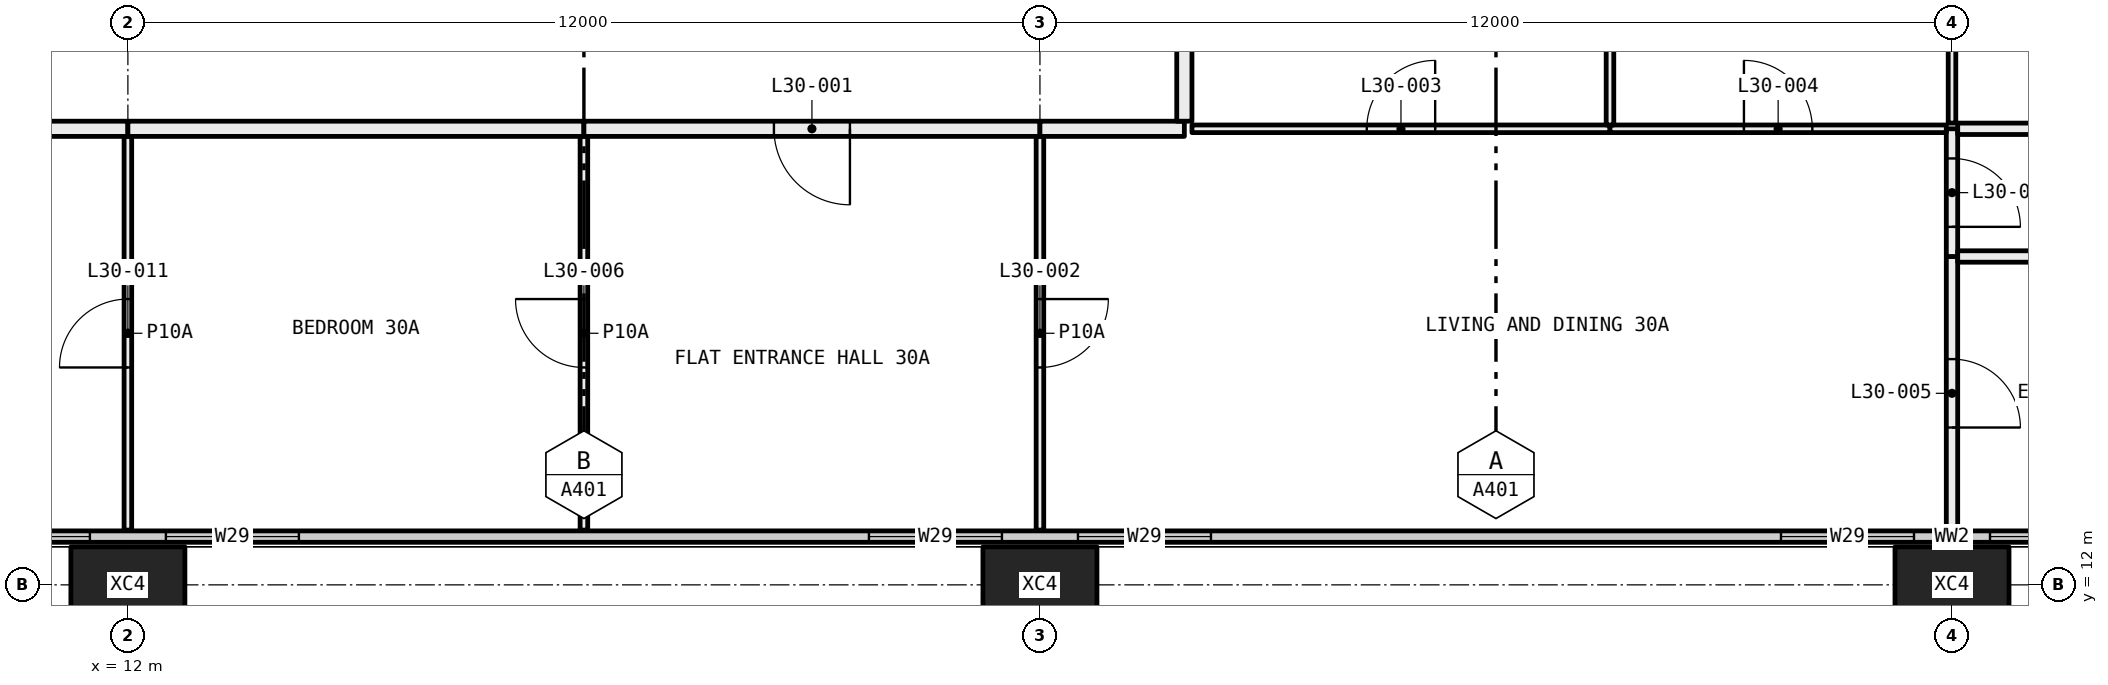
"""IFC4 building model, lengths in metres.
Left out: names, types, materials, properties, quantities, classifications, styles, units other than length and angle.
Written with IfcOpenShell. Run it as: python <this file> out.ifc"""

import sys

from ifc_helpers import new_model, si_unit, direction, frame, frame_2d, origin, origin_2d, place, context, subcontext, project, spatial, rectangle, hollow_rectangle, extrude, element, fill, save


model = new_model("IFC4")
c1 = context("Model", 3, precision=1e-05, world=origin(), true_north=direction((0.0, 1.0)))
c2 = subcontext(c1, "Body", "Model", "MODEL_VIEW")
j1 = project(units=[si_unit("LENGTHUNIT", "METRE"), si_unit("PLANEANGLEUNIT", "RADIAN")], contexts=[c1])
p1 = place(None, origin())
s1 = spatial("IfcSite", under=j1, at=p1, CompositionType="ELEMENT")
p2 = place(p1, origin())
s2 = spatial("IfcBuilding", under=s1, at=p2, CompositionType="ELEMENT")
p3 = place(p2, frame((0.0, 0.0, 117.3)))
s3 = spatial("IfcBuildingStorey", under=s2, at=p3, CompositionType="ELEMENT", Elevation=117.3)
for number, where, z_axis, x_axis in (
    (1, (12.0, 12.0, -0.4), (0.0, 0.0, 1.0), (1.0, 0.0, 0.0)),
    (2, (24.0, 12.0, -0.4), (0.0, 0.0, 1.0), (1.0, 0.0, 0.0)),
    (3, (36.0, 12.0, -0.4), (0.0, 0.0, 1.0), (1.0, 0.0, 0.0)),
):
    element("IfcColumn", number, at=place(p3, frame(where, z_axis=z_axis, x_axis=x_axis)), inside=s3, PredefinedType="COLUMN", context=c2, shape_type="SweptSolid", body=[
        extrude(hollow_rectangle(XDim=1.5, YDim=1.0, WallThickness=0.06, at=origin_2d()), origin(), (0.0, 0.0, 1.0), 3.45),
    ])
p4 = place(p3, frame((6.56, 12.635, 0.0), z_axis=(0.0, 0.0, 1.0), x_axis=(1.0, 0.0, 0.0)))
e4 = element("IfcWall", 4, at=p4, inside=s3, PredefinedType="ELEMENTEDWALL", context=c2, shape_type="SweptSolid", body=[
    extrude(rectangle(XDim=58.88, YDim=0.15, at=frame_2d((29.44, 0.0))), origin(), (0.0, 0.0, 1.0), 3.05),
])
p5 = place(p4, frame((0.44, 0.0, 0.45)))
e5 = element("IfcOpeningElement", 5, at=p5, cuts=e4, PredefinedType="OPENING", context=c2, shape_type="SweptSolid", body=[
    extrude(rectangle(XDim=4.5, YDim=2.55, at=frame_2d((2.25, 1.275))), frame((0.0, 0.085, 0.0), z_axis=(0.0, -1.0, 0.0), x_axis=(1.0, 0.0, 0.0)), (0.0, 0.0, 1.0), 0.17),
])
p6 = place(p4, frame((5.94, 0.0, 0.45)))
e6 = element("IfcOpeningElement", 6, at=p6, cuts=e4, PredefinedType="OPENING", context=c2, shape_type="SweptSolid", body=[
    extrude(rectangle(XDim=1.75, YDim=2.55, at=frame_2d((0.875, 1.275))), frame((0.0, 0.085, 0.0), z_axis=(0.0, -1.0, 0.0), x_axis=(1.0, 0.0, 0.0)), (0.0, 0.0, 1.0), 0.17),
])
p7 = place(p4, frame((15.19, 0.0, 0.45)))
e7 = element("IfcOpeningElement", 7, at=p7, cuts=e4, PredefinedType="OPENING", context=c2, shape_type="SweptSolid", body=[
    extrude(rectangle(XDim=1.75, YDim=2.55, at=frame_2d((0.875, 1.275))), frame((0.0, 0.085, 0.0), z_axis=(0.0, -1.0, 0.0), x_axis=(1.0, 0.0, 0.0)), (0.0, 0.0, 1.0), 0.17),
])
p8 = place(p4, frame((17.94, 0.0, 0.45)))
e8 = element("IfcOpeningElement", 8, at=p8, cuts=e4, PredefinedType="OPENING", context=c2, shape_type="SweptSolid", body=[
    extrude(rectangle(XDim=1.75, YDim=2.55, at=frame_2d((0.875, 1.275))), frame((0.0, 0.085, 0.0), z_axis=(0.0, -1.0, 0.0), x_axis=(1.0, 0.0, 0.0)), (0.0, 0.0, 1.0), 0.17),
])
p9 = place(p4, frame((27.19, 0.0, 0.45)))
e9 = element("IfcOpeningElement", 9, at=p9, cuts=e4, PredefinedType="OPENING", context=c2, shape_type="SweptSolid", body=[
    extrude(rectangle(XDim=1.75, YDim=2.55, at=frame_2d((0.875, 1.275))), frame((0.0, 0.085, 0.0), z_axis=(0.0, -1.0, 0.0), x_axis=(1.0, 0.0, 0.0)), (0.0, 0.0, 1.0), 0.17),
])
p10 = place(p4, frame((29.94, 0.0, 0.45)))
e10 = element("IfcOpeningElement", 10, at=p10, cuts=e4, PredefinedType="OPENING", context=c2, shape_type="SweptSolid", body=[
    extrude(rectangle(XDim=1.75, YDim=2.55, at=frame_2d((0.875, 1.275))), frame((0.0, 0.085, 0.0), z_axis=(0.0, -1.0, 0.0), x_axis=(1.0, 0.0, 0.0)), (0.0, 0.0, 1.0), 0.17),
])
p11 = place(p4, frame((39.19, 0.0, 0.45)))
e11 = element("IfcOpeningElement", 11, at=p11, cuts=e4, PredefinedType="OPENING", context=c2, shape_type="SweptSolid", body=[
    extrude(rectangle(XDim=1.75, YDim=2.55, at=frame_2d((0.875, 1.275))), frame((0.0, 0.085, 0.0), z_axis=(0.0, -1.0, 0.0), x_axis=(1.0, 0.0, 0.0)), (0.0, 0.0, 1.0), 0.17),
])
p12 = place(p4, frame((41.94, 0.0, 0.45)))
e12 = element("IfcOpeningElement", 12, at=p12, cuts=e4, PredefinedType="OPENING", context=c2, shape_type="SweptSolid", body=[
    extrude(rectangle(XDim=1.75, YDim=2.55, at=frame_2d((0.875, 1.275))), frame((0.0, 0.085, 0.0), z_axis=(0.0, -1.0, 0.0), x_axis=(1.0, 0.0, 0.0)), (0.0, 0.0, 1.0), 0.17),
])
p13 = place(p4, frame((51.19, 0.0, 0.45)))
e13 = element("IfcOpeningElement", 13, at=p13, cuts=e4, PredefinedType="OPENING", context=c2, shape_type="SweptSolid", body=[
    extrude(rectangle(XDim=1.75, YDim=2.55, at=frame_2d((0.875, 1.275))), frame((0.0, 0.085, 0.0), z_axis=(0.0, -1.0, 0.0), x_axis=(1.0, 0.0, 0.0)), (0.0, 0.0, 1.0), 0.17),
])
p14 = place(p4, frame((53.94, 0.0, 0.45)))
e14 = element("IfcOpeningElement", 14, at=p14, cuts=e4, PredefinedType="OPENING", context=c2, shape_type="SweptSolid", body=[
    extrude(rectangle(XDim=4.5, YDim=2.55, at=frame_2d((2.25, 1.275))), frame((0.0, 0.085, 0.0), z_axis=(0.0, -1.0, 0.0), x_axis=(1.0, 0.0, 0.0)), (0.0, 0.0, 1.0), 0.17),
])
p15 = place(p3, frame((12.0, 12.72, 0.0), z_axis=(0.0, 0.0, 1.0), x_axis=(0.0, 1.0, 0.0)))
e15 = element("IfcWall", 15, at=p15, inside=s3, PredefinedType="PARTITIONING", context=c2, shape_type="SweptSolid", body=[
    extrude(rectangle(XDim=5.18, YDim=0.1, at=frame_2d((2.59, 0.0))), origin(), (0.0, 0.0, 1.0), 3.05),
])
p16 = place(p15, frame((2.14, 0.0, 0.0)))
e16 = element("IfcOpeningElement", 16, at=p16, cuts=e15, PredefinedType="OPENING", context=c2, shape_type="SweptSolid", body=[
    extrude(rectangle(XDim=0.9, YDim=2.1, at=frame_2d((0.45, 1.05))), frame((0.0, 0.06, 0.0), z_axis=(0.0, -1.0, 0.0), x_axis=(1.0, 0.0, 0.0)), (0.0, 0.0, 1.0), 0.12),
])
p17 = place(p3, frame((12.0, 18.0, 0.0), z_axis=(0.0, 0.0, 1.0), x_axis=(-1.0, 0.0, 0.0)))
e17 = element("IfcWall", 17, at=p17, inside=s3, PredefinedType="PARTITIONING", context=c2, shape_type="SweptSolid", body=[
    extrude(rectangle(XDim=1.9, YDim=0.2, at=frame_2d((0.95, 0.0))), origin(), (0.0, 0.0, 1.0), 3.05),
])
p18 = place(p3, frame((18.0, 12.72, 0.0), z_axis=(0.0, 0.0, 1.0), x_axis=(0.0, 1.0, 0.0)))
e18 = element("IfcWall", 18, at=p18, inside=s3, PredefinedType="PARTITIONING", context=c2, shape_type="SweptSolid", body=[
    extrude(rectangle(XDim=5.18, YDim=0.1, at=frame_2d((2.59, 0.0))), origin(), (0.0, 0.0, 1.0), 3.05),
])
p19 = place(p18, frame((2.14, 0.0, 0.0)))
e19 = element("IfcOpeningElement", 19, at=p19, cuts=e18, PredefinedType="OPENING", context=c2, shape_type="SweptSolid", body=[
    extrude(rectangle(XDim=0.9, YDim=2.1, at=frame_2d((0.45, 1.05))), frame((0.0, 0.06, 0.0), z_axis=(0.0, -1.0, 0.0), x_axis=(1.0, 0.0, 0.0)), (0.0, 0.0, 1.0), 0.12),
])
p20 = place(p3, frame((18.0, 18.0, 0.0), z_axis=(0.0, 0.0, 1.0), x_axis=(-1.0, 0.0, 0.0)))
e20 = element("IfcWall", 20, at=p20, inside=s3, PredefinedType="PARTITIONING", context=c2, shape_type="SweptSolid", body=[
    extrude(rectangle(XDim=6.0, YDim=0.2, at=frame_2d((3.0, 0.0))), origin(), (0.0, 0.0, 1.0), 3.05),
])
p21 = place(p3, frame((24.0, 12.72, 0.0), z_axis=(0.0, 0.0, 1.0), x_axis=(0.0, 1.0, 0.0)))
e21 = element("IfcWall", 21, at=p21, inside=s3, PredefinedType="PARTITIONING", context=c2, shape_type="SweptSolid", body=[
    extrude(rectangle(XDim=5.18, YDim=0.1, at=frame_2d((2.59, 0.0))), origin(), (0.0, 0.0, 1.0), 3.05),
])
p22 = place(p21, frame((2.14, 0.0, 0.0)))
e22 = element("IfcOpeningElement", 22, at=p22, cuts=e21, PredefinedType="OPENING", context=c2, shape_type="SweptSolid", body=[
    extrude(rectangle(XDim=0.9, YDim=2.1, at=frame_2d((0.45, 1.05))), frame((0.0, 0.06, 0.0), z_axis=(0.0, -1.0, 0.0), x_axis=(1.0, 0.0, 0.0)), (0.0, 0.0, 1.0), 0.12),
])
p23 = place(p3, frame((24.0, 18.0, 0.0), z_axis=(0.0, 0.0, 1.0), x_axis=(-1.0, 0.0, 0.0)))
e23 = element("IfcWall", 23, at=p23, inside=s3, PredefinedType="PARTITIONING", context=c2, shape_type="SweptSolid", body=[
    extrude(rectangle(XDim=6.0, YDim=0.2, at=frame_2d((3.0, 0.0))), origin(), (0.0, 0.0, 1.0), 3.05),
])
p24 = place(p23, frame((2.5, 0.0, 0.0)))
e24 = element("IfcOpeningElement", 24, at=p24, cuts=e23, PredefinedType="OPENING", context=c2, shape_type="SweptSolid", body=[
    extrude(rectangle(XDim=1.0, YDim=2.1, at=frame_2d((0.5, 1.05))), frame((0.0, 0.11, 0.0), z_axis=(0.0, -1.0, 0.0), x_axis=(1.0, 0.0, 0.0)), (0.0, 0.0, 1.0), 0.22),
])
p25 = place(p3, frame((36.0, 12.72, 0.0), z_axis=(0.0, 0.0, 1.0), x_axis=(0.0, 1.0, 0.0)))
e25 = element("IfcWall", 25, at=p25, inside=s3, PredefinedType="PARTITIONING", context=c2, shape_type="SweptSolid", body=[
    extrude(rectangle(XDim=3.6, YDim=0.15, at=frame_2d((1.8, 0.0))), origin(), (0.0, 0.0, 1.0), 2.45),
])
p26 = place(p25, frame((1.35, 0.0, 0.0)))
e26 = element("IfcOpeningElement", 26, at=p26, cuts=e25, PredefinedType="OPENING", context=c2, shape_type="SweptSolid", body=[
    extrude(rectangle(XDim=0.9, YDim=2.1, at=frame_2d((0.45, 1.05))), frame((0.0, 0.085, 0.0), z_axis=(0.0, -1.0, 0.0), x_axis=(1.0, 0.0, 0.0)), (0.0, 0.0, 1.0), 0.17),
])
p27 = place(p3, frame((36.0, 16.32, 0.0), z_axis=(0.0, 0.0, 1.0), x_axis=(0.0, 1.0, 0.0)))
e27 = element("IfcWall", 27, at=p27, inside=s3, PredefinedType="PARTITIONING", context=c2, shape_type="SweptSolid", body=[
    extrude(rectangle(XDim=1.68, YDim=0.15, at=frame_2d((0.84, 0.0))), origin(), (0.0, 0.0, 1.0), 2.45),
])
p28 = place(p27, frame((0.39, 0.0, 0.0)))
e28 = element("IfcOpeningElement", 28, at=p28, cuts=e27, PredefinedType="OPENING", context=c2, shape_type="SweptSolid", body=[
    extrude(rectangle(XDim=0.9, YDim=2.1, at=frame_2d((0.45, 1.05))), frame((0.0, 0.085, 0.0), z_axis=(0.0, -1.0, 0.0), x_axis=(1.0, 0.0, 0.0)), (0.0, 0.0, 1.0), 0.17),
])
p29 = place(p3, frame((31.5, 18.0, 0.0), z_axis=(0.0, 0.0, 1.0), x_axis=(-1.0, 0.0, 0.0)))
e29 = element("IfcWall", 29, at=p29, inside=s3, PredefinedType="PARTITIONING", context=c2, shape_type="SweptSolid", body=[
    extrude(rectangle(XDim=5.5, YDim=0.1, at=frame_2d((2.75, 0.0))), origin(), (0.0, 0.0, 1.0), 3.05),
])
p30 = place(p29, frame((2.3, 0.0, 0.0)))
e30 = element("IfcOpeningElement", 30, at=p30, cuts=e29, PredefinedType="OPENING", context=c2, shape_type="SweptSolid", body=[
    extrude(rectangle(XDim=0.9, YDim=2.1, at=frame_2d((0.45, 1.05))), frame((0.0, 0.06, 0.0), z_axis=(0.0, -1.0, 0.0), x_axis=(1.0, 0.0, 0.0)), (0.0, 0.0, 1.0), 0.12),
])
p31 = place(p3, frame((35.925, 18.0, 0.0), z_axis=(0.0, 0.0, 1.0), x_axis=(-1.0, 0.0, 0.0)))
e31 = element("IfcWall", 31, at=p31, inside=s3, PredefinedType="PARTITIONING", context=c2, shape_type="SweptSolid", body=[
    extrude(rectangle(XDim=4.425, YDim=0.1, at=frame_2d((2.212, 0.0))), origin(), (0.0, 0.0, 1.0), 2.45),
])
p32 = place(p31, frame((1.762, 0.0, 0.0)))
e32 = element("IfcOpeningElement", 32, at=p32, cuts=e31, PredefinedType="OPENING", context=c2, shape_type="SweptSolid", body=[
    extrude(rectangle(XDim=0.9, YDim=2.1, at=frame_2d((0.45, 1.05))), frame((0.0, 0.06, 0.0), z_axis=(0.0, -1.0, 0.0), x_axis=(1.0, 0.0, 0.0)), (0.0, 0.0, 1.0), 0.12),
])
p33 = place(p3, frame((25.9, 18.0, 0.0), z_axis=(0.0, 0.0, 1.0), x_axis=(-1.0, 0.0, 0.0)))
e33 = element("IfcWall", 33, at=p33, inside=s3, PredefinedType="PARTITIONING", context=c2, shape_type="SweptSolid", body=[
    extrude(rectangle(XDim=1.9, YDim=0.2, at=frame_2d((0.95, 0.0))), origin(), (0.0, 0.0, 1.0), 3.05),
])
for number, where, z_axis, x_axis in (
    (34, (41.9, 16.32, 0.0), (0.0, 0.0, 1.0), (-1.0, 0.0, 0.0)),
    (35, (41.9, 18.0, 0.0), (0.0, 0.0, 1.0), (-1.0, 0.0, 0.0)),
):
    element("IfcWall", number, at=place(p3, frame(where, z_axis=z_axis, x_axis=x_axis)), inside=s3, PredefinedType="PARTITIONING", context=c2, shape_type="SweptSolid", body=[
        extrude(rectangle(XDim=5.825, YDim=0.15, at=frame_2d((2.913, 0.0))), origin(), (0.0, 0.0, 1.0), 2.45),
    ])
p34 = place(p3, frame((31.5, 18.05, 0.0), z_axis=(0.0, 0.0, 1.0), x_axis=(0.0, 1.0, 0.0)))
e36 = element("IfcWall", 36, at=p34, inside=s3, PredefinedType="PARTITIONING", context=c2, shape_type="SweptSolid", body=[
    extrude(rectangle(XDim=6.25, YDim=0.1, at=frame_2d((3.125, 0.0))), origin(), (0.0, 0.0, 1.0), 2.45),
])
p35 = place(p3, frame((25.9, 23.9, 0.0), z_axis=(0.0, 0.0, 1.0), x_axis=(0.0, -1.0, 0.0)))
e37 = element("IfcWall", 37, at=p35, inside=s3, PredefinedType="PARTITIONING", context=c2, shape_type="SweptSolid", body=[
    extrude(rectangle(XDim=5.8, YDim=0.2, at=frame_2d((2.9, 0.0))), origin(), (0.0, 0.0, 1.0), 3.05),
])
p36 = place(p3, frame((36.0, 18.075, 0.0), z_axis=(0.0, 0.0, 1.0), x_axis=(0.0, 1.0, 0.0)))
e38 = element("IfcWall", 38, at=p36, inside=s3, PredefinedType="PARTITIONING", context=c2, shape_type="SweptSolid", body=[
    extrude(rectangle(XDim=5.175, YDim=0.1, at=frame_2d((2.587, 0.0))), origin(), (0.0, 0.0, 1.0), 2.45),
])
p37 = place(p36, frame((2.137, 0.0, 0.0)))
e39 = element("IfcOpeningElement", 39, at=p37, cuts=e38, PredefinedType="OPENING", context=c2, shape_type="SweptSolid", body=[
    extrude(rectangle(XDim=0.9, YDim=2.1, at=frame_2d((0.45, 1.05))), frame((0.0, 0.06, 0.0), z_axis=(0.0, -1.0, 0.0), x_axis=(1.0, 0.0, 0.0)), (0.0, 0.0, 1.0), 0.12),
])
p38 = place(p5, origin())
e40 = element("IfcWindow", 40, at=p38, inside=s3, PartitioningType="SINGLE_PANEL", PredefinedType="WINDOW", context=c2, shape_type="SweptSolid", body=[
    extrude(rectangle(XDim=4.5, YDim=2.55, at=frame_2d((2.25, 1.275))), frame((0.0, 0.03, 0.0), z_axis=(0.0, -1.0, 0.0), x_axis=(1.0, 0.0, 0.0)), (0.0, 0.0, 1.0), 0.06),
])
fill(e5, e40)
p39 = place(p6, origin())
e41 = element("IfcWindow", 41, at=p39, inside=s3, PartitioningType="SINGLE_PANEL", PredefinedType="WINDOW", context=c2, shape_type="SweptSolid", body=[
    extrude(rectangle(XDim=1.75, YDim=2.55, at=frame_2d((0.875, 1.275))), frame((0.0, 0.03, 0.0), z_axis=(0.0, -1.0, 0.0), x_axis=(1.0, 0.0, 0.0)), (0.0, 0.0, 1.0), 0.06),
])
fill(e6, e41)
p40 = place(p7, origin())
e42 = element("IfcWindow", 42, at=p40, inside=s3, PartitioningType="SINGLE_PANEL", PredefinedType="WINDOW", context=c2, shape_type="SweptSolid", body=[
    extrude(rectangle(XDim=1.75, YDim=2.55, at=frame_2d((0.875, 1.275))), frame((0.0, 0.03, 0.0), z_axis=(0.0, -1.0, 0.0), x_axis=(1.0, 0.0, 0.0)), (0.0, 0.0, 1.0), 0.06),
])
fill(e7, e42)
p41 = place(p8, origin())
e43 = element("IfcWindow", 43, at=p41, inside=s3, PartitioningType="SINGLE_PANEL", PredefinedType="WINDOW", context=c2, shape_type="SweptSolid", body=[
    extrude(rectangle(XDim=1.75, YDim=2.55, at=frame_2d((0.875, 1.275))), frame((0.0, 0.03, 0.0), z_axis=(0.0, -1.0, 0.0), x_axis=(1.0, 0.0, 0.0)), (0.0, 0.0, 1.0), 0.06),
])
fill(e8, e43)
p42 = place(p9, origin())
e44 = element("IfcWindow", 44, at=p42, inside=s3, PartitioningType="SINGLE_PANEL", PredefinedType="WINDOW", context=c2, shape_type="SweptSolid", body=[
    extrude(rectangle(XDim=1.75, YDim=2.55, at=frame_2d((0.875, 1.275))), frame((0.0, 0.03, 0.0), z_axis=(0.0, -1.0, 0.0), x_axis=(1.0, 0.0, 0.0)), (0.0, 0.0, 1.0), 0.06),
])
fill(e9, e44)
p43 = place(p10, origin())
e45 = element("IfcWindow", 45, at=p43, inside=s3, PartitioningType="SINGLE_PANEL", PredefinedType="WINDOW", context=c2, shape_type="SweptSolid", body=[
    extrude(rectangle(XDim=1.75, YDim=2.55, at=frame_2d((0.875, 1.275))), frame((0.0, 0.03, 0.0), z_axis=(0.0, -1.0, 0.0), x_axis=(1.0, 0.0, 0.0)), (0.0, 0.0, 1.0), 0.06),
])
fill(e10, e45)
p44 = place(p24, origin())
e46 = element("IfcDoor", 46, at=p44, inside=s3, OperationType="SINGLE_SWING_RIGHT", PredefinedType="DOOR", context=c2, shape_type="SweptSolid", body=[
    extrude(rectangle(XDim=1.0, YDim=2.1, at=frame_2d((0.5, 1.05))), frame((0.0, 0.025, 0.0), z_axis=(0.0, -1.0, 0.0), x_axis=(1.0, 0.0, 0.0)), (0.0, 0.0, 1.0), 0.05),
])
fill(e24, e46)
p45 = place(p22, frame((0.9, 0.0, 0.0), x_axis=(-1.0, 0.0, 0.0)))
e47 = element("IfcDoor", 47, at=p45, inside=s3, OperationType="SINGLE_SWING_RIGHT", PredefinedType="DOOR", context=c2, shape_type="SweptSolid", body=[
    extrude(rectangle(XDim=0.9, YDim=2.1, at=frame_2d((0.45, 1.05))), frame((0.0, 0.025, 0.0), z_axis=(0.0, -1.0, 0.0), x_axis=(1.0, 0.0, 0.0)), (0.0, 0.0, 1.0), 0.05),
])
fill(e22, e47)
p46 = place(p30, frame((0.9, 0.0, 0.0), x_axis=(-1.0, 0.0, 0.0)))
e48 = element("IfcDoor", 48, at=p46, inside=s3, OperationType="SINGLE_SWING_LEFT", PredefinedType="DOOR", context=c2, shape_type="SweptSolid", body=[
    extrude(rectangle(XDim=0.9, YDim=2.1, at=frame_2d((0.45, 1.05))), frame((0.0, 0.025, 0.0), z_axis=(0.0, -1.0, 0.0), x_axis=(1.0, 0.0, 0.0)), (0.0, 0.0, 1.0), 0.05),
])
fill(e30, e48)
p47 = place(p32, frame((0.9, 0.0, 0.0), x_axis=(-1.0, 0.0, 0.0)))
e49 = element("IfcDoor", 49, at=p47, inside=s3, OperationType="SINGLE_SWING_RIGHT", PredefinedType="DOOR", context=c2, shape_type="SweptSolid", body=[
    extrude(rectangle(XDim=0.9, YDim=2.1, at=frame_2d((0.45, 1.05))), frame((0.0, 0.025, 0.0), z_axis=(0.0, -1.0, 0.0), x_axis=(1.0, 0.0, 0.0)), (0.0, 0.0, 1.0), 0.05),
])
fill(e32, e49)
p48 = place(p26, frame((0.9, 0.0, 0.0), x_axis=(-1.0, 0.0, 0.0)))
e50 = element("IfcDoor", 50, at=p48, inside=s3, OperationType="SINGLE_SWING_LEFT", PredefinedType="DOOR", context=c2, shape_type="SweptSolid", body=[
    extrude(rectangle(XDim=0.9, YDim=2.1, at=frame_2d((0.45, 1.05))), frame((0.0, 0.025, 0.0), z_axis=(0.0, -1.0, 0.0), x_axis=(1.0, 0.0, 0.0)), (0.0, 0.0, 1.0), 0.05),
])
fill(e26, e50)
p49 = place(p19, origin())
e51 = element("IfcDoor", 51, at=p49, inside=s3, OperationType="SINGLE_SWING_LEFT", PredefinedType="DOOR", context=c2, shape_type="SweptSolid", body=[
    extrude(rectangle(XDim=0.9, YDim=2.1, at=frame_2d((0.45, 1.05))), frame((0.0, 0.025, 0.0), z_axis=(0.0, -1.0, 0.0), x_axis=(1.0, 0.0, 0.0)), (0.0, 0.0, 1.0), 0.05),
])
fill(e19, e51)
p50 = place(p28, frame((0.9, 0.0, 0.0), x_axis=(-1.0, 0.0, 0.0)))
e52 = element("IfcDoor", 52, at=p50, inside=s3, OperationType="SINGLE_SWING_LEFT", PredefinedType="DOOR", context=c2, shape_type="SweptSolid", body=[
    extrude(rectangle(XDim=0.9, YDim=2.1, at=frame_2d((0.45, 1.05))), frame((0.0, 0.025, 0.0), z_axis=(0.0, -1.0, 0.0), x_axis=(1.0, 0.0, 0.0)), (0.0, 0.0, 1.0), 0.05),
])
fill(e28, e52)
p51 = place(p16, origin())
e53 = element("IfcDoor", 53, at=p51, inside=s3, OperationType="SINGLE_SWING_RIGHT", PredefinedType="DOOR", context=c2, shape_type="SweptSolid", body=[
    extrude(rectangle(XDim=0.9, YDim=2.1, at=frame_2d((0.45, 1.05))), frame((0.0, 0.025, 0.0), z_axis=(0.0, -1.0, 0.0), x_axis=(1.0, 0.0, 0.0)), (0.0, 0.0, 1.0), 0.05),
])
fill(e16, e53)
save(model, sys.argv[1])
